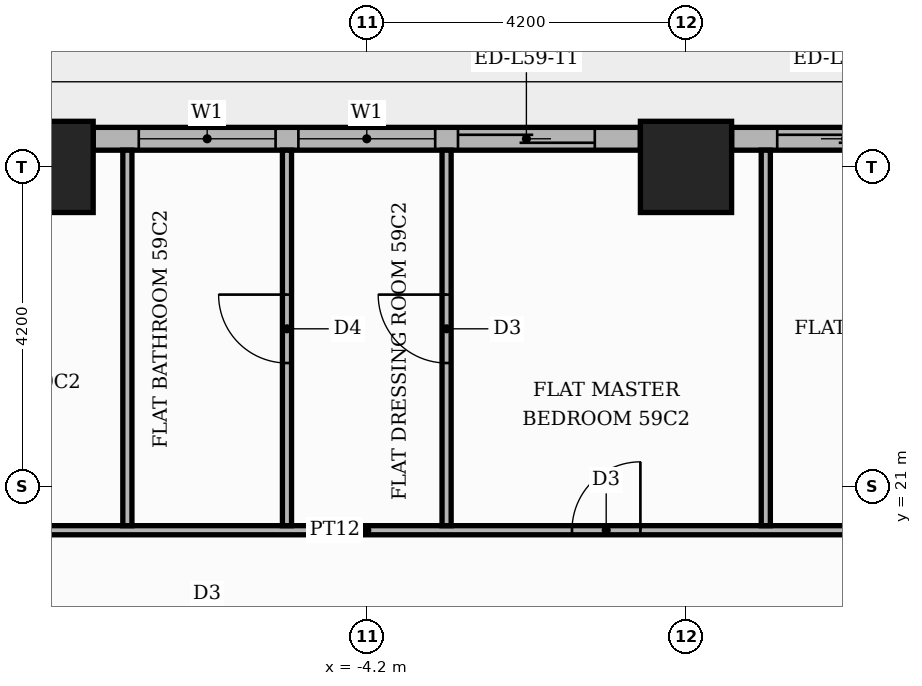
"""IFC4 building model, lengths in metres.
Left out: names, types, materials, properties, quantities, classifications, styles, units other than length and angle.
Written with IfcOpenShell. Run it as: python <this file> out.ifc"""

import sys

from ifc_helpers import new_model, si_unit, direction, frame, frame_2d, origin, origin_2d, place, context, subcontext, project, spatial, rectangle, extrude, element, fill, save


model = new_model("IFC4")
c1 = context("Model", 3, precision=1e-05, world=origin(), true_north=direction((0.0, 1.0)))
c2 = subcontext(c1, "Body", "Model", "MODEL_VIEW")
j1 = project(units=[si_unit("LENGTHUNIT", "METRE"), si_unit("PLANEANGLEUNIT", "RADIAN")], contexts=[c1])
p1 = place(None, origin())
s1 = spatial("IfcSite", under=j1, at=p1, CompositionType="ELEMENT")
p2 = place(p1, origin())
s2 = spatial("IfcBuilding", under=s1, at=p2, CompositionType="ELEMENT")
p3 = place(p2, frame((0.0, 0.0, 248.4)))
s3 = spatial("IfcBuildingStorey", under=s2, at=p3, CompositionType="ELEMENT", Elevation=248.4)
for number, where, z_axis, x_axis in (
    (1, (0.0, 25.2, 0.0), (0.0, 0.0, 1.0), (1.0, 0.0, 0.0)),
    (2, (-8.4, 25.2, 0.0), (0.0, 0.0, 1.0), (1.0, 0.0, 0.0)),
):
    element("IfcColumn", number, at=place(p3, frame(where, z_axis=z_axis, x_axis=x_axis)), inside=s3, PredefinedType="COLUMN", context=c2, shape_type="SweptSolid", body=[
        extrude(rectangle(XDim=1.2, YDim=1.2, at=origin_2d()), origin(), (0.0, 0.0, 1.0), 3.9),
    ])
p4 = place(p3, frame((7.8, 25.57, 0.0), z_axis=(0.0, 0.0, 1.0), x_axis=(-1.0, 0.0, 0.0)))
e3 = element("IfcWall", 3, at=p4, inside=s3, PredefinedType="STANDARD", context=c2, shape_type="SweptSolid", body=[
    extrude(rectangle(XDim=7.2, YDim=0.3, at=frame_2d((3.6, 0.0))), origin(), (0.0, 0.0, 1.0), 3.48),
])
p5 = place(p4, frame((0.6, 0.0, 0.9)))
e4 = element("IfcOpeningElement", 4, at=p5, cuts=e3, PredefinedType="OPENING", context=c2, shape_type="SweptSolid", body=[
    extrude(rectangle(XDim=1.8, YDim=2.1, at=frame_2d((0.9, 1.05))), frame((0.0, 0.16, 0.0), z_axis=(0.0, -1.0, 0.0), x_axis=(1.0, 0.0, 0.0)), (0.0, 0.0, 1.0), 0.32),
])
p6 = place(p4, frame((2.7, 0.0, 0.9)))
e5 = element("IfcOpeningElement", 5, at=p6, cuts=e3, PredefinedType="OPENING", context=c2, shape_type="SweptSolid", body=[
    extrude(rectangle(XDim=1.8, YDim=2.1, at=frame_2d((0.9, 1.05))), frame((0.0, 0.16, 0.0), z_axis=(0.0, -1.0, 0.0), x_axis=(1.0, 0.0, 0.0)), (0.0, 0.0, 1.0), 0.32),
])
p7 = place(p4, frame((4.8, 0.0, 0.0)))
e6 = element("IfcOpeningElement", 6, at=p7, cuts=e3, PredefinedType="OPENING", context=c2, shape_type="SweptSolid", body=[
    extrude(rectangle(XDim=1.8, YDim=2.4, at=frame_2d((0.9, 1.2))), frame((0.0, 0.16, 0.0), z_axis=(0.0, -1.0, 0.0), x_axis=(1.0, 0.0, 0.0)), (0.0, 0.0, 1.0), 0.32),
])
p8 = place(p3, frame((-0.6, 25.57, 0.0), z_axis=(0.0, 0.0, 1.0), x_axis=(-1.0, 0.0, 0.0)))
e7 = element("IfcWall", 7, at=p8, inside=s3, PredefinedType="STANDARD", context=c2, shape_type="SweptSolid", body=[
    extrude(rectangle(XDim=7.2, YDim=0.3, at=frame_2d((3.6, 0.0))), origin(), (0.0, 0.0, 1.0), 3.48),
])
p9 = place(p8, frame((0.6, 0.0, 0.0)))
e8 = element("IfcOpeningElement", 8, at=p9, cuts=e7, PredefinedType="OPENING", context=c2, shape_type="SweptSolid", body=[
    extrude(rectangle(XDim=1.8, YDim=2.4, at=frame_2d((0.9, 1.2))), frame((0.0, 0.16, 0.0), z_axis=(0.0, -1.0, 0.0), x_axis=(1.0, 0.0, 0.0)), (0.0, 0.0, 1.0), 0.32),
])
p10 = place(p8, frame((2.7, 0.0, 0.9)))
e9 = element("IfcOpeningElement", 9, at=p10, cuts=e7, PredefinedType="OPENING", context=c2, shape_type="SweptSolid", body=[
    extrude(rectangle(XDim=1.8, YDim=2.1, at=frame_2d((0.9, 1.05))), frame((0.0, 0.16, 0.0), z_axis=(0.0, -1.0, 0.0), x_axis=(1.0, 0.0, 0.0)), (0.0, 0.0, 1.0), 0.32),
])
p11 = place(p8, frame((4.8, 0.0, 0.9)))
e10 = element("IfcOpeningElement", 10, at=p11, cuts=e7, PredefinedType="OPENING", context=c2, shape_type="SweptSolid", body=[
    extrude(rectangle(XDim=1.8, YDim=2.1, at=frame_2d((0.9, 1.05))), frame((0.0, 0.16, 0.0), z_axis=(0.0, -1.0, 0.0), x_axis=(1.0, 0.0, 0.0)), (0.0, 0.0, 1.0), 0.32),
])
p12 = place(p3, frame((-13.55, 20.42, 0.0), z_axis=(0.0, 0.0, 1.0), x_axis=(1.0, 0.0, 0.0)))
e11 = element("IfcWall", 11, at=p12, inside=s3, PredefinedType="PARTITIONING", context=c2, shape_type="SweptSolid", body=[
    extrude(rectangle(XDim=18.7, YDim=0.12, at=frame_2d((9.35, 0.0))), origin(), (0.0, 0.0, 1.0), 3.48),
])
p13 = place(p12, frame((16.2, 0.0, 0.0)))
e12 = element("IfcOpeningElement", 12, at=p13, cuts=e11, PredefinedType="OPENING", context=c2, shape_type="SweptSolid", body=[
    extrude(rectangle(XDim=1.0, YDim=2.1, at=frame_2d((0.5, 1.05))), frame((0.0, 0.07, 0.0), z_axis=(0.0, -1.0, 0.0), x_axis=(1.0, 0.0, 0.0)), (0.0, 0.0, 1.0), 0.14),
])
p14 = place(p12, frame((12.05, 0.0, 0.0)))
e13 = element("IfcOpeningElement", 13, at=p14, cuts=e11, PredefinedType="OPENING", context=c2, shape_type="SweptSolid", body=[
    extrude(rectangle(XDim=0.9, YDim=2.1, at=frame_2d((0.45, 1.05))), frame((0.0, 0.07, 0.0), z_axis=(0.0, -1.0, 0.0), x_axis=(1.0, 0.0, 0.0)), (0.0, 0.0, 1.0), 0.14),
])
p15 = place(p12, frame((3.65, 0.0, 0.0)))
e14 = element("IfcOpeningElement", 14, at=p15, cuts=e11, PredefinedType="OPENING", context=c2, shape_type="SweptSolid", body=[
    extrude(rectangle(XDim=0.9, YDim=2.1, at=frame_2d((0.45, 1.05))), frame((0.0, 0.07, 0.0), z_axis=(0.0, -1.0, 0.0), x_axis=(1.0, 0.0, 0.0)), (0.0, 0.0, 1.0), 0.14),
])
p16 = place(p3, frame((-7.35, 20.48, 0.0), z_axis=(0.0, 0.0, 1.0), x_axis=(0.0, 1.0, 0.0)))
e15 = element("IfcWall", 15, at=p16, inside=s3, PredefinedType="PARTITIONING", context=c2, shape_type="SweptSolid", body=[
    extrude(rectangle(XDim=4.94, YDim=0.12, at=frame_2d((2.47, 0.0))), origin(), (0.0, 0.0, 1.0), 3.48),
])
p17 = place(p3, frame((-5.25, 20.48, 0.0), z_axis=(0.0, 0.0, 1.0), x_axis=(0.0, 1.0, 0.0)))
e16 = element("IfcWall", 16, at=p17, inside=s3, PredefinedType="PARTITIONING", context=c2, shape_type="SweptSolid", body=[
    extrude(rectangle(XDim=4.94, YDim=0.12, at=frame_2d((2.47, 0.0))), origin(), (0.0, 0.0, 1.0), 3.48),
])
p18 = place(p17, frame((2.14, 0.0, 0.0)))
e17 = element("IfcOpeningElement", 17, at=p18, cuts=e16, PredefinedType="OPENING", context=c2, shape_type="SweptSolid", body=[
    extrude(rectangle(XDim=0.9, YDim=2.1, at=frame_2d((0.45, 1.05))), frame((0.0, 0.07, 0.0), z_axis=(0.0, -1.0, 0.0), x_axis=(1.0, 0.0, 0.0)), (0.0, 0.0, 1.0), 0.14),
])
p19 = place(p3, frame((-3.15, 20.48, 0.0), z_axis=(0.0, 0.0, 1.0), x_axis=(0.0, 1.0, 0.0)))
e18 = element("IfcWall", 18, at=p19, inside=s3, PredefinedType="PARTITIONING", context=c2, shape_type="SweptSolid", body=[
    extrude(rectangle(XDim=4.94, YDim=0.12, at=frame_2d((2.47, 0.0))), origin(), (0.0, 0.0, 1.0), 3.48),
])
p20 = place(p19, frame((2.14, 0.0, 0.0)))
e19 = element("IfcOpeningElement", 19, at=p20, cuts=e18, PredefinedType="OPENING", context=c2, shape_type="SweptSolid", body=[
    extrude(rectangle(XDim=0.9, YDim=2.1, at=frame_2d((0.45, 1.05))), frame((0.0, 0.07, 0.0), z_axis=(0.0, -1.0, 0.0), x_axis=(1.0, 0.0, 0.0)), (0.0, 0.0, 1.0), 0.14),
])
p21 = place(p3, frame((1.05, 20.48, 0.0), z_axis=(0.0, 0.0, 1.0), x_axis=(0.0, 1.0, 0.0)))
e20 = element("IfcWall", 20, at=p21, inside=s3, PredefinedType="PARTITIONING", context=c2, shape_type="SweptSolid", body=[
    extrude(rectangle(XDim=4.94, YDim=0.12, at=frame_2d((2.47, 0.0))), origin(), (0.0, 0.0, 1.0), 3.48),
])
p22 = place(p7, origin())
e21 = element("IfcDoor", 21, at=p22, inside=s3, OperationType="SLIDING_TO_RIGHT", PredefinedType="DOOR", context=c2, shape_type="SweptSolid", body=[
    extrude(rectangle(XDim=1.8, YDim=2.4, at=frame_2d((0.9, 1.2))), frame((0.0, 0.025, 0.0), z_axis=(0.0, -1.0, 0.0), x_axis=(1.0, 0.0, 0.0)), (0.0, 0.0, 1.0), 0.05),
])
fill(e6, e21)
p23 = place(p9, origin())
e22 = element("IfcDoor", 22, at=p23, inside=s3, OperationType="SLIDING_TO_LEFT", PredefinedType="DOOR", context=c2, shape_type="SweptSolid", body=[
    extrude(rectangle(XDim=1.8, YDim=2.4, at=frame_2d((0.9, 1.2))), frame((0.0, 0.025, 0.0), z_axis=(0.0, -1.0, 0.0), x_axis=(1.0, 0.0, 0.0)), (0.0, 0.0, 1.0), 0.05),
])
fill(e8, e22)
p24 = place(p10, origin())
e23 = element("IfcWindow", 23, at=p24, inside=s3, PartitioningType="SINGLE_PANEL", PredefinedType="WINDOW", context=c2, shape_type="SweptSolid", body=[
    extrude(rectangle(XDim=1.8, YDim=2.1, at=frame_2d((0.9, 1.05))), frame((0.0, 0.03, 0.0), z_axis=(0.0, -1.0, 0.0), x_axis=(1.0, 0.0, 0.0)), (0.0, 0.0, 1.0), 0.06),
])
fill(e9, e23)
p25 = place(p11, origin())
e24 = element("IfcWindow", 24, at=p25, inside=s3, PartitioningType="SINGLE_PANEL", PredefinedType="WINDOW", context=c2, shape_type="SweptSolid", body=[
    extrude(rectangle(XDim=1.8, YDim=2.1, at=frame_2d((0.9, 1.05))), frame((0.0, 0.03, 0.0), z_axis=(0.0, -1.0, 0.0), x_axis=(1.0, 0.0, 0.0)), (0.0, 0.0, 1.0), 0.06),
])
fill(e10, e24)
p26 = place(p14, origin())
e25 = element("IfcDoor", 25, at=p26, inside=s3, OperationType="SINGLE_SWING_RIGHT", PredefinedType="DOOR", context=c2, shape_type="SweptSolid", body=[
    extrude(rectangle(XDim=0.9, YDim=2.1, at=frame_2d((0.45, 1.05))), frame((0.0, 0.025, 0.0), z_axis=(0.0, -1.0, 0.0), x_axis=(1.0, 0.0, 0.0)), (0.0, 0.0, 1.0), 0.05),
])
fill(e13, e25)
p27 = place(p20, origin())
e26 = element("IfcDoor", 26, at=p27, inside=s3, OperationType="SINGLE_SWING_RIGHT", PredefinedType="DOOR", context=c2, shape_type="SweptSolid", body=[
    extrude(rectangle(XDim=0.9, YDim=2.1, at=frame_2d((0.45, 1.05))), frame((0.0, 0.025, 0.0), z_axis=(0.0, -1.0, 0.0), x_axis=(1.0, 0.0, 0.0)), (0.0, 0.0, 1.0), 0.05),
])
fill(e19, e26)
p28 = place(p18, origin())
e27 = element("IfcDoor", 27, at=p28, inside=s3, OperationType="SINGLE_SWING_RIGHT", PredefinedType="DOOR", context=c2, shape_type="SweptSolid", body=[
    extrude(rectangle(XDim=0.9, YDim=2.1, at=frame_2d((0.45, 1.05))), frame((0.0, 0.025, 0.0), z_axis=(0.0, -1.0, 0.0), x_axis=(1.0, 0.0, 0.0)), (0.0, 0.0, 1.0), 0.05),
])
fill(e17, e27)
save(model, sys.argv[1])
